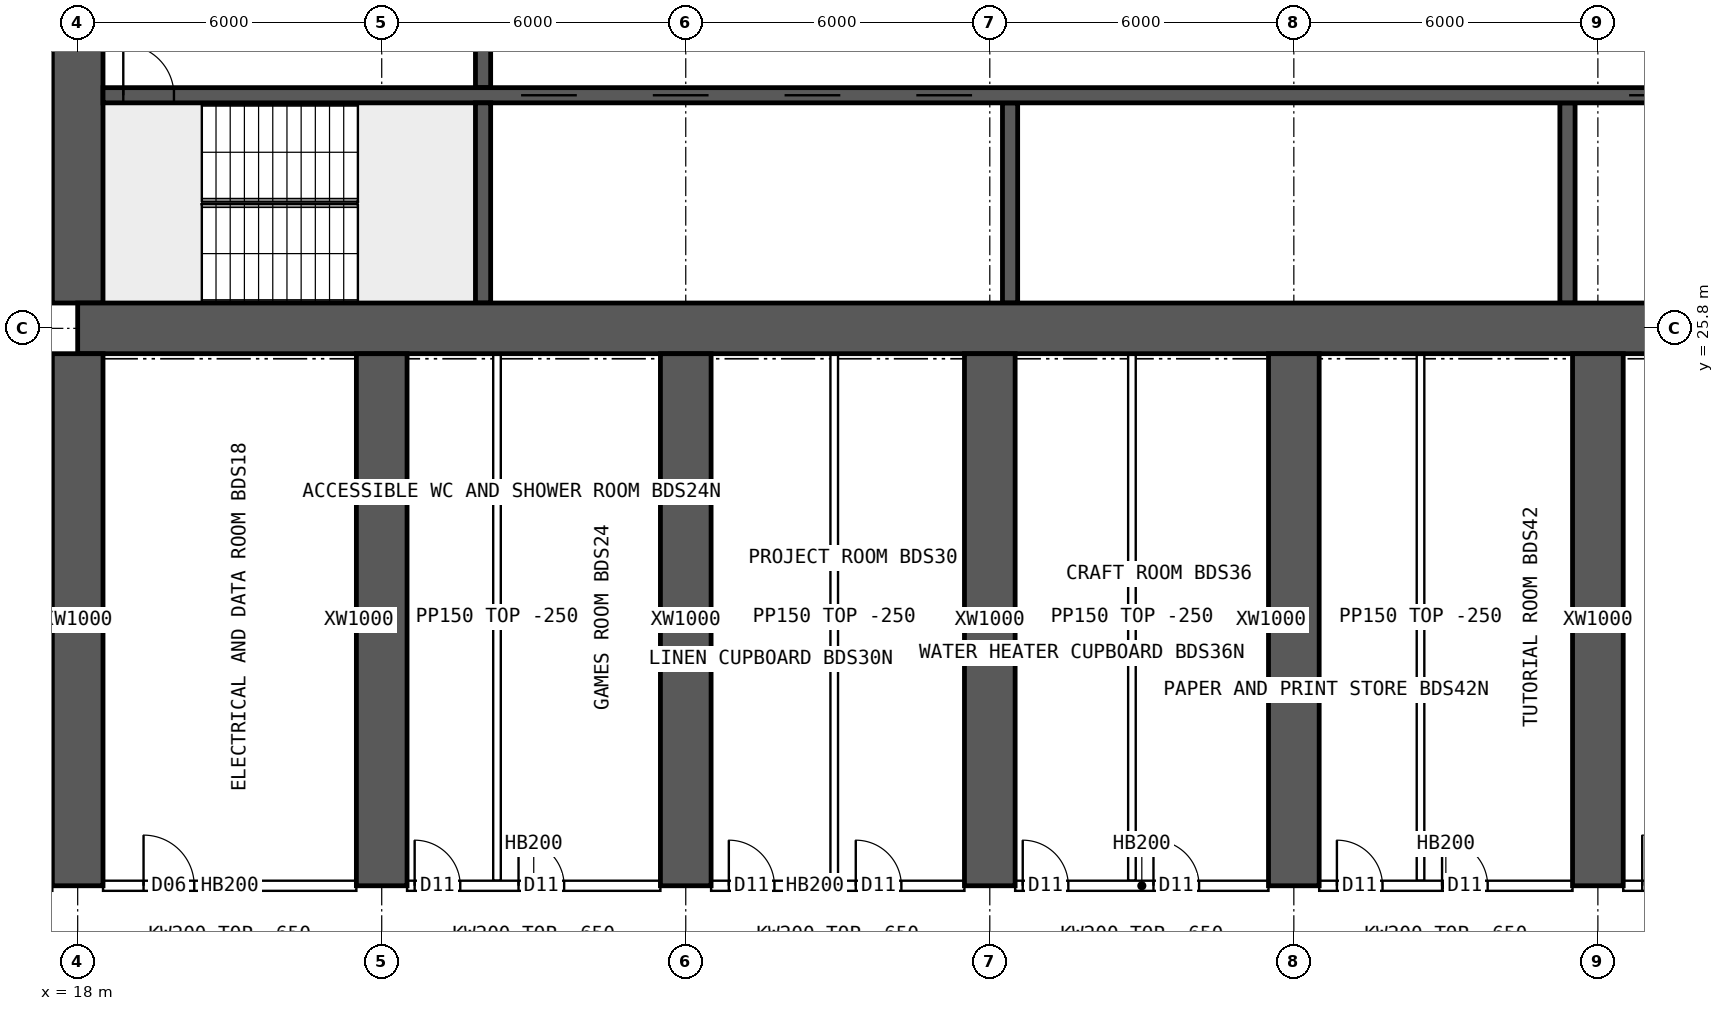
"""IFC4 building model, lengths in metres.
Left out: names, types, materials, properties, quantities, classifications, styles, units other than length and angle.
Written with IfcOpenShell. Run it as: python <this file> out.ifc"""

import sys

from ifc_helpers import new_model, si_unit, direction, frame, frame_2d, origin, place, context, subcontext, project, spatial, rectangle, extrude, element, fill, save


model = new_model("IFC4")
c1 = context("Model", 3, precision=1e-05, world=origin(), true_north=direction((0.0, 1.0)))
c2 = subcontext(c1, "Body", "Model", "MODEL_VIEW")
j1 = project(units=[si_unit("LENGTHUNIT", "METRE"), si_unit("PLANEANGLEUNIT", "RADIAN")], contexts=[c1])
p1 = place(None, origin())
s1 = spatial("IfcSite", under=j1, at=p1, CompositionType="ELEMENT")
p2 = place(p1, origin())
s2 = spatial("IfcBuilding", under=s1, at=p2, CompositionType="ELEMENT")
p3 = place(p2, frame((0.0, 0.0, 16.0)))
s3 = spatial("IfcBuildingStorey", under=s2, at=p3, CompositionType="ELEMENT", Elevation=16.0)
p4 = place(p3, frame((18.0, 25.8, 0.0), z_axis=(0.0, 0.0, 1.0), x_axis=(1.0, 0.0, 0.0)))
e1 = element("IfcWall", 1, at=p4, inside=s3, PredefinedType="SHEAR", context=c2, shape_type="SweptSolid", body=[
    extrude(rectangle(XDim=48.0, YDim=1.0, at=frame_2d((24.0, 0.0))), origin(), (0.0, 0.0, 1.0), 4.2),
])
p5 = place(p3, frame((18.0, 26.3, 0.0), z_axis=(0.0, 0.0, 1.0), x_axis=(0.0, 1.0, 0.0)))
e2 = element("IfcWall", 2, at=p5, inside=s3, PredefinedType="SHEAR", context=c2, shape_type="SweptSolid", body=[
    extrude(rectangle(XDim=11.4, YDim=1.0, at=frame_2d((5.7, 0.0))), origin(), (0.0, 0.0, 1.0), 4.2),
])
p6 = place(p5, frame((5.0, 0.0, 0.0)))
e3 = element("IfcOpeningElement", 3, at=p6, cuts=e2, PredefinedType="OPENING", context=c2, shape_type="SweptSolid", body=[
    extrude(rectangle(XDim=1.2, YDim=2.1, at=frame_2d((0.6, 1.05))), frame((0.0, 0.51, 0.0), z_axis=(0.0, -1.0, 0.0), x_axis=(1.0, 0.0, 0.0)), (0.0, 0.0, 1.0), 1.02),
])
p7 = place(p3, frame((18.5, 30.4, 0.0), z_axis=(0.0, 0.0, 1.0), x_axis=(1.0, 0.0, 0.0)))
e4 = element("IfcWall", 4, at=p7, inside=s3, PredefinedType="SHEAR", context=c2, shape_type="SweptSolid", body=[
    extrude(rectangle(XDim=47.0, YDim=0.3, at=frame_2d((23.5, 0.0))), origin(), (0.0, 0.0, 1.0), 4.2),
])
p8 = place(p7, frame((0.4, 0.0, 0.0)))
e5 = element("IfcOpeningElement", 5, at=p8, cuts=e4, PredefinedType="OPENING", context=c2, shape_type="SweptSolid", body=[
    extrude(rectangle(XDim=1.0, YDim=2.1, at=frame_2d((0.5, 1.05))), frame((0.0, 0.16, 0.0), z_axis=(0.0, -1.0, 0.0), x_axis=(1.0, 0.0, 0.0)), (0.0, 0.0, 1.0), 0.32),
])
p9 = place(p7, frame((45.6, 0.0, 0.0)))
e6 = element("IfcOpeningElement", 6, at=p9, cuts=e4, PredefinedType="OPENING", context=c2, shape_type="SweptSolid", body=[
    extrude(rectangle(XDim=1.0, YDim=2.1, at=frame_2d((0.5, 1.05))), frame((0.0, 0.16, 0.0), z_axis=(0.0, -1.0, 0.0), x_axis=(1.0, 0.0, 0.0)), (0.0, 0.0, 1.0), 0.32),
])
p10 = place(p7, frame((8.25, 0.0, 0.0)))
e7 = element("IfcOpeningElement", 7, at=p10, cuts=e4, PredefinedType="OPENING", context=c2, shape_type="SweptSolid", body=[
    extrude(rectangle(XDim=1.1, YDim=2.1, at=frame_2d((0.55, 1.05))), frame((0.0, 0.16, 0.0), z_axis=(0.0, -1.0, 0.0), x_axis=(1.0, 0.0, 0.0)), (0.0, 0.0, 1.0), 0.32),
])
p11 = place(p7, frame((10.85, 0.0, 0.0)))
e8 = element("IfcOpeningElement", 8, at=p11, cuts=e4, PredefinedType="OPENING", context=c2, shape_type="SweptSolid", body=[
    extrude(rectangle(XDim=1.1, YDim=2.1, at=frame_2d((0.55, 1.05))), frame((0.0, 0.16, 0.0), z_axis=(0.0, -1.0, 0.0), x_axis=(1.0, 0.0, 0.0)), (0.0, 0.0, 1.0), 0.32),
])
p12 = place(p7, frame((13.45, 0.0, 0.0)))
e9 = element("IfcOpeningElement", 9, at=p12, cuts=e4, PredefinedType="OPENING", context=c2, shape_type="SweptSolid", body=[
    extrude(rectangle(XDim=1.1, YDim=2.1, at=frame_2d((0.55, 1.05))), frame((0.0, 0.16, 0.0), z_axis=(0.0, -1.0, 0.0), x_axis=(1.0, 0.0, 0.0)), (0.0, 0.0, 1.0), 0.32),
])
p13 = place(p7, frame((16.05, 0.0, 0.0)))
e10 = element("IfcOpeningElement", 10, at=p13, cuts=e4, PredefinedType="OPENING", context=c2, shape_type="SweptSolid", body=[
    extrude(rectangle(XDim=1.1, YDim=2.1, at=frame_2d((0.55, 1.05))), frame((0.0, 0.16, 0.0), z_axis=(0.0, -1.0, 0.0), x_axis=(1.0, 0.0, 0.0)), (0.0, 0.0, 1.0), 0.32),
])
p14 = place(p7, frame((30.117, 0.0, 0.0)))
e11 = element("IfcOpeningElement", 11, at=p14, cuts=e4, PredefinedType="OPENING", context=c2, shape_type="SweptSolid", body=[
    extrude(rectangle(XDim=1.1, YDim=2.1, at=frame_2d((0.55, 1.05))), frame((0.0, 0.16, 0.0), z_axis=(0.0, -1.0, 0.0), x_axis=(1.0, 0.0, 0.0)), (0.0, 0.0, 1.0), 0.32),
])
p15 = place(p7, frame((33.65, 0.0, 0.0)))
e12 = element("IfcOpeningElement", 12, at=p15, cuts=e4, PredefinedType="OPENING", context=c2, shape_type="SweptSolid", body=[
    extrude(rectangle(XDim=1.1, YDim=2.1, at=frame_2d((0.55, 1.05))), frame((0.0, 0.16, 0.0), z_axis=(0.0, -1.0, 0.0), x_axis=(1.0, 0.0, 0.0)), (0.0, 0.0, 1.0), 0.32),
])
p16 = place(p7, frame((37.183, 0.0, 0.0)))
e13 = element("IfcOpeningElement", 13, at=p16, cuts=e4, PredefinedType="OPENING", context=c2, shape_type="SweptSolid", body=[
    extrude(rectangle(XDim=1.1, YDim=2.1, at=frame_2d((0.55, 1.05))), frame((0.0, 0.16, 0.0), z_axis=(0.0, -1.0, 0.0), x_axis=(1.0, 0.0, 0.0)), (0.0, 0.0, 1.0), 0.32),
])
p17 = place(p3, frame((26.0, 26.3, 0.0), z_axis=(0.0, 0.0, 1.0), x_axis=(0.0, 1.0, 0.0)))
e14 = element("IfcWall", 14, at=p17, inside=s3, PredefinedType="SHEAR", context=c2, shape_type="SweptSolid", body=[
    extrude(rectangle(XDim=3.95, YDim=0.3, at=frame_2d((1.975, 0.0))), origin(), (0.0, 0.0, 1.0), 4.2),
])
p18 = place(p3, frame((26.0, 30.55, 0.0), z_axis=(0.0, 0.0, 1.0), x_axis=(0.0, 1.0, 0.0)))
e15 = element("IfcWall", 15, at=p18, inside=s3, PredefinedType="SHEAR", context=c2, shape_type="SweptSolid", body=[
    extrude(rectangle(XDim=3.9, YDim=0.3, at=frame_2d((1.95, 0.0))), origin(), (0.0, 0.0, 1.0), 4.2),
])
p19 = place(p18, frame((1.4, 0.0, 0.0)))
e16 = element("IfcOpeningElement", 16, at=p19, cuts=e15, PredefinedType="OPENING", context=c2, shape_type="SweptSolid", body=[
    extrude(rectangle(XDim=1.2, YDim=2.1, at=frame_2d((0.6, 1.05))), frame((0.0, 0.16, 0.0), z_axis=(0.0, -1.0, 0.0), x_axis=(1.0, 0.0, 0.0)), (0.0, 0.0, 1.0), 0.32),
])
for number, where, z_axis, x_axis in (
    (17, (36.4, 26.3, 0.0), (0.0, 0.0, 1.0), (0.0, 1.0, 0.0)),
    (18, (47.4, 26.3, 0.0), (0.0, 0.0, 1.0), (0.0, 1.0, 0.0)),
):
    element("IfcWall", number, at=place(p3, frame(where, z_axis=z_axis, x_axis=x_axis)), inside=s3, PredefinedType="SHEAR", context=c2, shape_type="SweptSolid", body=[
        extrude(rectangle(XDim=3.95, YDim=0.3, at=frame_2d((1.975, 0.0))), origin(), (0.0, 0.0, 1.0), 4.2),
    ])
for number, where, z_axis, x_axis in (
    (19, (18.0, 14.8, 0.0), (0.0, 0.0, 1.0), (0.0, 1.0, 0.0)),
    (20, (24.0, 14.8, 0.0), (0.0, 0.0, 1.0), (0.0, 1.0, 0.0)),
    (21, (30.0, 14.8, 0.0), (0.0, 0.0, 1.0), (0.0, 1.0, 0.0)),
    (22, (36.0, 14.8, 0.0), (0.0, 0.0, 1.0), (0.0, 1.0, 0.0)),
    (23, (42.0, 14.8, 0.0), (0.0, 0.0, 1.0), (0.0, 1.0, 0.0)),
    (24, (48.0, 14.8, 0.0), (0.0, 0.0, 1.0), (0.0, 1.0, 0.0)),
):
    element("IfcWall", number, at=place(p3, frame(where, z_axis=z_axis, x_axis=x_axis)), inside=s3, PredefinedType="SHEAR", context=c2, shape_type="SweptSolid", body=[
        extrude(rectangle(XDim=10.5, YDim=1.0, at=frame_2d((5.25, 0.0))), origin(), (0.0, 0.0, 1.0), 4.2),
    ])
p20 = place(p3, frame((18.5, 14.8, 0.0), z_axis=(0.0, 0.0, 1.0), x_axis=(1.0, 0.0, 0.0)))
e25 = element("IfcWall", 25, at=p20, inside=s3, PredefinedType="SOLIDWALL", context=c2, shape_type="SweptSolid", body=[
    extrude(rectangle(XDim=5.0, YDim=0.2, at=frame_2d((2.5, 0.0))), origin(), (0.0, 0.0, 1.0), 3.95),
])
p21 = place(p20, frame((0.8, 0.0, 0.0)))
e26 = element("IfcOpeningElement", 26, at=p21, cuts=e25, PredefinedType="OPENING", context=c2, shape_type="SweptSolid", body=[
    extrude(rectangle(XDim=1.0, YDim=2.1, at=frame_2d((0.5, 1.05))), frame((0.0, 0.11, 0.0), z_axis=(0.0, -1.0, 0.0), x_axis=(1.0, 0.0, 0.0)), (0.0, 0.0, 1.0), 0.22),
])
p22 = place(p3, frame((24.5, 14.8, 0.0), z_axis=(0.0, 0.0, 1.0), x_axis=(1.0, 0.0, 0.0)))
e27 = element("IfcWall", 27, at=p22, inside=s3, PredefinedType="SOLIDWALL", context=c2, shape_type="SweptSolid", body=[
    extrude(rectangle(XDim=5.0, YDim=0.2, at=frame_2d((2.5, 0.0))), origin(), (0.0, 0.0, 1.0), 3.95),
])
p23 = place(p22, frame((0.15, 0.0, 0.0)))
e28 = element("IfcOpeningElement", 28, at=p23, cuts=e27, PredefinedType="OPENING", context=c2, shape_type="SweptSolid", body=[
    extrude(rectangle(XDim=0.9, YDim=2.1, at=frame_2d((0.45, 1.05))), frame((0.0, 0.11, 0.0), z_axis=(0.0, -1.0, 0.0), x_axis=(1.0, 0.0, 0.0)), (0.0, 0.0, 1.0), 0.22),
])
p24 = place(p22, frame((2.2, 0.0, 0.0)))
e29 = element("IfcOpeningElement", 29, at=p24, cuts=e27, PredefinedType="OPENING", context=c2, shape_type="SweptSolid", body=[
    extrude(rectangle(XDim=0.9, YDim=2.1, at=frame_2d((0.45, 1.05))), frame((0.0, 0.11, 0.0), z_axis=(0.0, -1.0, 0.0), x_axis=(1.0, 0.0, 0.0)), (0.0, 0.0, 1.0), 0.22),
])
p25 = place(p3, frame((30.5, 14.8, 0.0), z_axis=(0.0, 0.0, 1.0), x_axis=(1.0, 0.0, 0.0)))
e30 = element("IfcWall", 30, at=p25, inside=s3, PredefinedType="SOLIDWALL", context=c2, shape_type="SweptSolid", body=[
    extrude(rectangle(XDim=5.0, YDim=0.2, at=frame_2d((2.5, 0.0))), origin(), (0.0, 0.0, 1.0), 3.95),
])
p26 = place(p25, frame((0.35, 0.0, 0.0)))
e31 = element("IfcOpeningElement", 31, at=p26, cuts=e30, PredefinedType="OPENING", context=c2, shape_type="SweptSolid", body=[
    extrude(rectangle(XDim=0.9, YDim=2.1, at=frame_2d((0.45, 1.05))), frame((0.0, 0.11, 0.0), z_axis=(0.0, -1.0, 0.0), x_axis=(1.0, 0.0, 0.0)), (0.0, 0.0, 1.0), 0.22),
])
p27 = place(p25, frame((2.855, 0.0, 0.0)))
e32 = element("IfcOpeningElement", 32, at=p27, cuts=e30, PredefinedType="OPENING", context=c2, shape_type="SweptSolid", body=[
    extrude(rectangle(XDim=0.9, YDim=2.1, at=frame_2d((0.45, 1.05))), frame((0.0, 0.11, 0.0), z_axis=(0.0, -1.0, 0.0), x_axis=(1.0, 0.0, 0.0)), (0.0, 0.0, 1.0), 0.22),
])
p28 = place(p3, frame((36.5, 14.8, 0.0), z_axis=(0.0, 0.0, 1.0), x_axis=(1.0, 0.0, 0.0)))
e33 = element("IfcWall", 33, at=p28, inside=s3, PredefinedType="SOLIDWALL", context=c2, shape_type="SweptSolid", body=[
    extrude(rectangle(XDim=5.0, YDim=0.2, at=frame_2d((2.5, 0.0))), origin(), (0.0, 0.0, 1.0), 3.95),
])
p29 = place(p28, frame((0.15, 0.0, 0.0)))
e34 = element("IfcOpeningElement", 34, at=p29, cuts=e33, PredefinedType="OPENING", context=c2, shape_type="SweptSolid", body=[
    extrude(rectangle(XDim=0.9, YDim=2.1, at=frame_2d((0.45, 1.05))), frame((0.0, 0.11, 0.0), z_axis=(0.0, -1.0, 0.0), x_axis=(1.0, 0.0, 0.0)), (0.0, 0.0, 1.0), 0.22),
])
p30 = place(p28, frame((2.73, 0.0, 0.0)))
e35 = element("IfcOpeningElement", 35, at=p30, cuts=e33, PredefinedType="OPENING", context=c2, shape_type="SweptSolid", body=[
    extrude(rectangle(XDim=0.9, YDim=2.1, at=frame_2d((0.45, 1.05))), frame((0.0, 0.11, 0.0), z_axis=(0.0, -1.0, 0.0), x_axis=(1.0, 0.0, 0.0)), (0.0, 0.0, 1.0), 0.22),
])
p31 = place(p3, frame((42.5, 14.8, 0.0), z_axis=(0.0, 0.0, 1.0), x_axis=(1.0, 0.0, 0.0)))
e36 = element("IfcWall", 36, at=p31, inside=s3, PredefinedType="SOLIDWALL", context=c2, shape_type="SweptSolid", body=[
    extrude(rectangle(XDim=5.0, YDim=0.2, at=frame_2d((2.5, 0.0))), origin(), (0.0, 0.0, 1.0), 3.95),
])
p32 = place(p31, frame((0.35, 0.0, 0.0)))
e37 = element("IfcOpeningElement", 37, at=p32, cuts=e36, PredefinedType="OPENING", context=c2, shape_type="SweptSolid", body=[
    extrude(rectangle(XDim=0.9, YDim=2.1, at=frame_2d((0.45, 1.05))), frame((0.0, 0.11, 0.0), z_axis=(0.0, -1.0, 0.0), x_axis=(1.0, 0.0, 0.0)), (0.0, 0.0, 1.0), 0.22),
])
p33 = place(p31, frame((2.425, 0.0, 0.0)))
e38 = element("IfcOpeningElement", 38, at=p33, cuts=e36, PredefinedType="OPENING", context=c2, shape_type="SweptSolid", body=[
    extrude(rectangle(XDim=0.9, YDim=2.1, at=frame_2d((0.45, 1.05))), frame((0.0, 0.11, 0.0), z_axis=(0.0, -1.0, 0.0), x_axis=(1.0, 0.0, 0.0)), (0.0, 0.0, 1.0), 0.22),
])
p34 = place(p3, frame((48.5, 14.8, 0.0), z_axis=(0.0, 0.0, 1.0), x_axis=(1.0, 0.0, 0.0)))
e39 = element("IfcWall", 39, at=p34, inside=s3, PredefinedType="SOLIDWALL", context=c2, shape_type="SweptSolid", body=[
    extrude(rectangle(XDim=5.0, YDim=0.2, at=frame_2d((2.5, 0.0))), origin(), (0.0, 0.0, 1.0), 3.95),
])
p35 = place(p34, frame((0.375, 0.0, 0.0)))
e40 = element("IfcOpeningElement", 40, at=p35, cuts=e39, PredefinedType="OPENING", context=c2, shape_type="SweptSolid", body=[
    extrude(rectangle(XDim=1.0, YDim=2.1, at=frame_2d((0.5, 1.05))), frame((0.0, 0.11, 0.0), z_axis=(0.0, -1.0, 0.0), x_axis=(1.0, 0.0, 0.0)), (0.0, 0.0, 1.0), 0.22),
])
for number, where, z_axis, x_axis in (
    (41, (26.275, 14.9, 0.0), (0.0, 0.0, 1.0), (0.0, 1.0, 0.0)),
    (42, (32.93, 14.9, 0.0), (0.0, 0.0, 1.0), (0.0, 1.0, 0.0)),
    (43, (38.805, 14.9, 0.0), (0.0, 0.0, 1.0), (0.0, 1.0, 0.0)),
    (44, (44.5, 14.9, 0.0), (0.0, 0.0, 1.0), (0.0, 1.0, 0.0)),
):
    element("IfcWall", number, at=place(p3, frame(where, z_axis=z_axis, x_axis=x_axis)), inside=s3, PredefinedType="PARTITIONING", context=c2, shape_type="SweptSolid", body=[
        extrude(rectangle(XDim=10.4, YDim=0.15, at=frame_2d((5.2, 0.0))), origin(), (0.0, 0.0, 1.0), 3.95),
    ])
p36 = place(p8, origin())
e45 = element("IfcDoor", 45, at=p36, inside=s3, OperationType="SINGLE_SWING_LEFT", PredefinedType="DOOR", context=c2, shape_type="SweptSolid", body=[
    extrude(rectangle(XDim=1.0, YDim=2.1, at=frame_2d((0.5, 1.05))), frame((0.0, 0.025, 0.0), z_axis=(0.0, -1.0, 0.0), x_axis=(1.0, 0.0, 0.0)), (0.0, 0.0, 1.0), 0.05),
])
fill(e5, e45)
p37 = place(p10, origin())
e46 = element("IfcDoor", 46, at=p37, inside=s3, OperationType="DOUBLE_DOOR_SLIDING", PredefinedType="DOOR", context=c2, shape_type="SweptSolid", body=[
    extrude(rectangle(XDim=1.1, YDim=2.1, at=frame_2d((0.55, 1.05))), frame((0.0, 0.025, 0.0), z_axis=(0.0, -1.0, 0.0), x_axis=(1.0, 0.0, 0.0)), (0.0, 0.0, 1.0), 0.05),
])
fill(e7, e46)
p38 = place(p11, origin())
e47 = element("IfcDoor", 47, at=p38, inside=s3, OperationType="DOUBLE_DOOR_SLIDING", PredefinedType="DOOR", context=c2, shape_type="SweptSolid", body=[
    extrude(rectangle(XDim=1.1, YDim=2.1, at=frame_2d((0.55, 1.05))), frame((0.0, 0.025, 0.0), z_axis=(0.0, -1.0, 0.0), x_axis=(1.0, 0.0, 0.0)), (0.0, 0.0, 1.0), 0.05),
])
fill(e8, e47)
p39 = place(p12, origin())
e48 = element("IfcDoor", 48, at=p39, inside=s3, OperationType="DOUBLE_DOOR_SLIDING", PredefinedType="DOOR", context=c2, shape_type="SweptSolid", body=[
    extrude(rectangle(XDim=1.1, YDim=2.1, at=frame_2d((0.55, 1.05))), frame((0.0, 0.025, 0.0), z_axis=(0.0, -1.0, 0.0), x_axis=(1.0, 0.0, 0.0)), (0.0, 0.0, 1.0), 0.05),
])
fill(e9, e48)
p40 = place(p13, origin())
e49 = element("IfcDoor", 49, at=p40, inside=s3, OperationType="DOUBLE_DOOR_SLIDING", PredefinedType="DOOR", context=c2, shape_type="SweptSolid", body=[
    extrude(rectangle(XDim=1.1, YDim=2.1, at=frame_2d((0.55, 1.05))), frame((0.0, 0.025, 0.0), z_axis=(0.0, -1.0, 0.0), x_axis=(1.0, 0.0, 0.0)), (0.0, 0.0, 1.0), 0.05),
])
fill(e10, e49)
p41 = place(p14, origin())
e50 = element("IfcDoor", 50, at=p41, inside=s3, OperationType="DOUBLE_DOOR_SLIDING", PredefinedType="DOOR", context=c2, shape_type="SweptSolid", body=[
    extrude(rectangle(XDim=1.1, YDim=2.1, at=frame_2d((0.55, 1.05))), frame((0.0, 0.025, 0.0), z_axis=(0.0, -1.0, 0.0), x_axis=(1.0, 0.0, 0.0)), (0.0, 0.0, 1.0), 0.05),
])
fill(e11, e50)
p42 = place(p21, origin())
e51 = element("IfcDoor", 51, at=p42, inside=s3, OperationType="SINGLE_SWING_LEFT", PredefinedType="DOOR", context=c2, shape_type="SweptSolid", body=[
    extrude(rectangle(XDim=1.0, YDim=2.1, at=frame_2d((0.5, 1.05))), frame((0.0, 0.025, 0.0), z_axis=(0.0, -1.0, 0.0), x_axis=(1.0, 0.0, 0.0)), (0.0, 0.0, 1.0), 0.05),
])
fill(e26, e51)
p43 = place(p23, origin())
e52 = element("IfcDoor", 52, at=p43, inside=s3, OperationType="SINGLE_SWING_LEFT", PredefinedType="DOOR", context=c2, shape_type="SweptSolid", body=[
    extrude(rectangle(XDim=0.9, YDim=2.1, at=frame_2d((0.45, 1.05))), frame((0.0, 0.025, 0.0), z_axis=(0.0, -1.0, 0.0), x_axis=(1.0, 0.0, 0.0)), (0.0, 0.0, 1.0), 0.05),
])
fill(e28, e52)
p44 = place(p24, origin())
e53 = element("IfcDoor", 53, at=p44, inside=s3, OperationType="SINGLE_SWING_LEFT", PredefinedType="DOOR", context=c2, shape_type="SweptSolid", body=[
    extrude(rectangle(XDim=0.9, YDim=2.1, at=frame_2d((0.45, 1.05))), frame((0.0, 0.025, 0.0), z_axis=(0.0, -1.0, 0.0), x_axis=(1.0, 0.0, 0.0)), (0.0, 0.0, 1.0), 0.05),
])
fill(e29, e53)
p45 = place(p26, origin())
e54 = element("IfcDoor", 54, at=p45, inside=s3, OperationType="SINGLE_SWING_LEFT", PredefinedType="DOOR", context=c2, shape_type="SweptSolid", body=[
    extrude(rectangle(XDim=0.9, YDim=2.1, at=frame_2d((0.45, 1.05))), frame((0.0, 0.025, 0.0), z_axis=(0.0, -1.0, 0.0), x_axis=(1.0, 0.0, 0.0)), (0.0, 0.0, 1.0), 0.05),
])
fill(e31, e54)
p46 = place(p27, origin())
e55 = element("IfcDoor", 55, at=p46, inside=s3, OperationType="SINGLE_SWING_LEFT", PredefinedType="DOOR", context=c2, shape_type="SweptSolid", body=[
    extrude(rectangle(XDim=0.9, YDim=2.1, at=frame_2d((0.45, 1.05))), frame((0.0, 0.025, 0.0), z_axis=(0.0, -1.0, 0.0), x_axis=(1.0, 0.0, 0.0)), (0.0, 0.0, 1.0), 0.05),
])
fill(e32, e55)
p47 = place(p29, origin())
e56 = element("IfcDoor", 56, at=p47, inside=s3, OperationType="SINGLE_SWING_LEFT", PredefinedType="DOOR", context=c2, shape_type="SweptSolid", body=[
    extrude(rectangle(XDim=0.9, YDim=2.1, at=frame_2d((0.45, 1.05))), frame((0.0, 0.025, 0.0), z_axis=(0.0, -1.0, 0.0), x_axis=(1.0, 0.0, 0.0)), (0.0, 0.0, 1.0), 0.05),
])
fill(e34, e56)
p48 = place(p30, origin())
e57 = element("IfcDoor", 57, at=p48, inside=s3, OperationType="SINGLE_SWING_LEFT", PredefinedType="DOOR", context=c2, shape_type="SweptSolid", body=[
    extrude(rectangle(XDim=0.9, YDim=2.1, at=frame_2d((0.45, 1.05))), frame((0.0, 0.025, 0.0), z_axis=(0.0, -1.0, 0.0), x_axis=(1.0, 0.0, 0.0)), (0.0, 0.0, 1.0), 0.05),
])
fill(e35, e57)
p49 = place(p32, origin())
e58 = element("IfcDoor", 58, at=p49, inside=s3, OperationType="SINGLE_SWING_LEFT", PredefinedType="DOOR", context=c2, shape_type="SweptSolid", body=[
    extrude(rectangle(XDim=0.9, YDim=2.1, at=frame_2d((0.45, 1.05))), frame((0.0, 0.025, 0.0), z_axis=(0.0, -1.0, 0.0), x_axis=(1.0, 0.0, 0.0)), (0.0, 0.0, 1.0), 0.05),
])
fill(e37, e58)
p50 = place(p33, origin())
e59 = element("IfcDoor", 59, at=p50, inside=s3, OperationType="SINGLE_SWING_LEFT", PredefinedType="DOOR", context=c2, shape_type="SweptSolid", body=[
    extrude(rectangle(XDim=0.9, YDim=2.1, at=frame_2d((0.45, 1.05))), frame((0.0, 0.025, 0.0), z_axis=(0.0, -1.0, 0.0), x_axis=(1.0, 0.0, 0.0)), (0.0, 0.0, 1.0), 0.05),
])
fill(e38, e59)
p51 = place(p35, origin())
e60 = element("IfcDoor", 60, at=p51, inside=s3, OperationType="SINGLE_SWING_LEFT", PredefinedType="DOOR", context=c2, shape_type="SweptSolid", body=[
    extrude(rectangle(XDim=1.0, YDim=2.1, at=frame_2d((0.5, 1.05))), frame((0.0, 0.025, 0.0), z_axis=(0.0, -1.0, 0.0), x_axis=(1.0, 0.0, 0.0)), (0.0, 0.0, 1.0), 0.05),
])
fill(e40, e60)
save(model, sys.argv[1])
